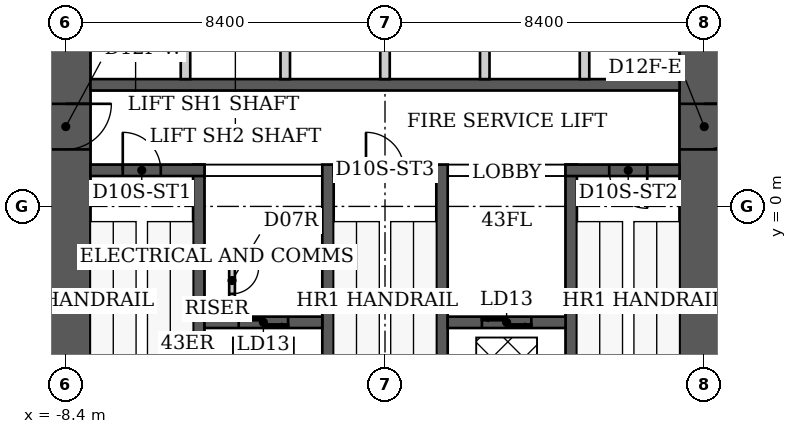
"""IFC4 building model, lengths in metres.
Left out: names, types, materials, properties, quantities, classifications, styles, units other than length and angle.
Written with IfcOpenShell. Run it as: python <this file> out.ifc"""

import sys

from ifc_helpers import new_model, si_unit, direction, frame, frame_2d, origin, place, context, subcontext, project, spatial, rectangle, extrude, element, fill, save


model = new_model("IFC4")
c1 = context("Model", 3, precision=1e-05, world=origin(), true_north=direction((0.0, 1.0)))
c2 = subcontext(c1, "Body", "Model", "MODEL_VIEW")
j1 = project(units=[si_unit("LENGTHUNIT", "METRE"), si_unit("PLANEANGLEUNIT", "RADIAN")], contexts=[c1])
p1 = place(None, origin())
s1 = spatial("IfcSite", under=j1, at=p1, CompositionType="ELEMENT")
p2 = place(p1, origin())
s2 = spatial("IfcBuilding", under=s1, at=p2, CompositionType="ELEMENT")
p3 = place(p2, frame((0.0, 0.0, 172.8)))
s3 = spatial("IfcBuildingStorey", under=s2, at=p3, CompositionType="ELEMENT", Elevation=172.8)
p4 = place(p3, frame((-8.4, -9.2, 0.0), z_axis=(0.0, 0.0, 1.0), x_axis=(0.0, 1.0, 0.0)))
e1 = element("IfcWall", 1, at=p4, inside=s3, PredefinedType="SHEAR", context=c2, shape_type="SweptSolid", body=[
    extrude(rectangle(XDim=15.3, YDim=1.3, at=frame_2d((7.65, 0.0))), origin(), (0.0, 0.0, 1.0), 5.4),
])
p5 = place(p4, frame((10.7, 0.0, 0.0)))
e2 = element("IfcOpeningElement", 2, at=p5, cuts=e1, PredefinedType="OPENING", context=c2, shape_type="SweptSolid", body=[
    extrude(rectangle(XDim=1.2, YDim=2.2, at=frame_2d((0.6, 1.1))), frame((0.0, 0.65, 0.0), z_axis=(0.0, -1.0, 0.0), x_axis=(1.0, 0.0, 0.0)), (0.0, 0.0, 1.0), 1.3),
])
p6 = place(p3, frame((8.4, -9.2, 0.0), z_axis=(0.0, 0.0, 1.0), x_axis=(0.0, 1.0, 0.0)))
e3 = element("IfcWall", 3, at=p6, inside=s3, PredefinedType="SHEAR", context=c2, shape_type="SweptSolid", body=[
    extrude(rectangle(XDim=15.3, YDim=1.3, at=frame_2d((7.65, 0.0))), origin(), (0.0, 0.0, 1.0), 5.4),
])
p7 = place(p6, frame((10.7, 0.0, 0.0)))
e4 = element("IfcOpeningElement", 4, at=p7, cuts=e3, PredefinedType="OPENING", context=c2, shape_type="SweptSolid", body=[
    extrude(rectangle(XDim=1.2, YDim=2.2, at=frame_2d((0.6, 1.1))), frame((0.0, 0.65, 0.0), z_axis=(0.0, -1.0, 0.0), x_axis=(1.0, 0.0, 0.0)), (0.0, 0.0, 1.0), 1.3),
])
for number, where, z_axis, x_axis in (
    (5, (-4.9, -6.1, 0.0), (0.0, 0.0, 1.0), (0.0, 1.0, 0.0)),
    (6, (-1.5, -6.1, 0.0), (0.0, 0.0, 1.0), (0.0, 1.0, 0.0)),
    (7, (1.5, -6.1, 0.0), (0.0, 0.0, 1.0), (0.0, 1.0, 0.0)),
    (8, (4.9, -6.1, 0.0), (0.0, 0.0, 1.0), (0.0, 1.0, 0.0)),
):
    element("IfcWall", number, at=place(p3, frame(where, z_axis=z_axis, x_axis=x_axis)), inside=s3, PredefinedType="SHEAR", context=c2, shape_type="SweptSolid", body=[
        extrude(rectangle(XDim=7.2, YDim=0.3, at=frame_2d((3.6, 0.0))), origin(), (0.0, 0.0, 1.0), 5.4),
    ])
p8 = place(p3, frame((-7.75, 0.95, 0.0), z_axis=(0.0, 0.0, 1.0), x_axis=(1.0, 0.0, 0.0)))
e9 = element("IfcWall", 9, at=p8, inside=s3, PredefinedType="SHEAR", context=c2, shape_type="SweptSolid", body=[
    extrude(rectangle(XDim=3.0, YDim=0.3, at=frame_2d((1.5, 0.0))), origin(), (0.0, 0.0, 1.0), 5.4),
])
p9 = place(p8, frame((0.85, 0.0, 0.0)))
e10 = element("IfcOpeningElement", 10, at=p9, cuts=e9, PredefinedType="OPENING", context=c2, shape_type="SweptSolid", body=[
    extrude(rectangle(XDim=1.0, YDim=2.2, at=frame_2d((0.5, 1.1))), frame((0.0, 0.15, 0.0), z_axis=(0.0, -1.0, 0.0), x_axis=(1.0, 0.0, 0.0)), (0.0, 0.0, 1.0), 0.3),
])
p10 = place(p3, frame((-1.35, 0.95, 0.0), z_axis=(0.0, 0.0, 1.0), x_axis=(1.0, 0.0, 0.0)))
e11 = element("IfcWall", 11, at=p10, inside=s3, PredefinedType="SHEAR", context=c2, shape_type="SweptSolid", body=[
    extrude(rectangle(XDim=2.7, YDim=0.3, at=frame_2d((1.35, 0.0))), origin(), (0.0, 0.0, 1.0), 5.4),
])
p11 = place(p10, frame((0.85, 0.0, 0.0)))
e12 = element("IfcOpeningElement", 12, at=p11, cuts=e11, PredefinedType="OPENING", context=c2, shape_type="SweptSolid", body=[
    extrude(rectangle(XDim=1.0, YDim=2.2, at=frame_2d((0.5, 1.1))), frame((0.0, 0.15, 0.0), z_axis=(0.0, -1.0, 0.0), x_axis=(1.0, 0.0, 0.0)), (0.0, 0.0, 1.0), 0.3),
])
p12 = place(p3, frame((4.75, 0.95, 0.0), z_axis=(0.0, 0.0, 1.0), x_axis=(1.0, 0.0, 0.0)))
e13 = element("IfcWall", 13, at=p12, inside=s3, PredefinedType="SHEAR", context=c2, shape_type="SweptSolid", body=[
    extrude(rectangle(XDim=3.0, YDim=0.3, at=frame_2d((1.5, 0.0))), origin(), (0.0, 0.0, 1.0), 5.4),
])
p13 = place(p12, frame((1.15, 0.0, 0.0)))
e14 = element("IfcOpeningElement", 14, at=p13, cuts=e13, PredefinedType="OPENING", context=c2, shape_type="SweptSolid", body=[
    extrude(rectangle(XDim=1.0, YDim=2.2, at=frame_2d((0.5, 1.1))), frame((0.0, 0.15, 0.0), z_axis=(0.0, -1.0, 0.0), x_axis=(1.0, 0.0, 0.0)), (0.0, 0.0, 1.0), 0.3),
])
p14 = place(p3, frame((-4.75, -3.05, 0.0), z_axis=(0.0, 0.0, 1.0), x_axis=(1.0, 0.0, 0.0)))
e15 = element("IfcWall", 15, at=p14, inside=s3, PredefinedType="SHEAR", context=c2, shape_type="SweptSolid", body=[
    extrude(rectangle(XDim=3.1, YDim=0.3, at=frame_2d((1.55, 0.0))), origin(), (0.0, 0.0, 1.0), 5.4),
])
p15 = place(p14, frame((0.9, 0.0, 0.0)))
e16 = element("IfcOpeningElement", 16, at=p15, cuts=e15, PredefinedType="OPENING", context=c2, shape_type="SweptSolid", body=[
    extrude(rectangle(XDim=1.3, YDim=2.1, at=frame_2d((0.65, 1.05))), frame((0.0, 0.15, 0.0), z_axis=(0.0, -1.0, 0.0), x_axis=(1.0, 0.0, 0.0)), (0.0, 0.0, 1.0), 0.3),
])
p16 = place(p3, frame((1.65, -3.05, 0.0), z_axis=(0.0, 0.0, 1.0), x_axis=(1.0, 0.0, 0.0)))
e17 = element("IfcWall", 17, at=p16, inside=s3, PredefinedType="SHEAR", context=c2, shape_type="SweptSolid", body=[
    extrude(rectangle(XDim=3.1, YDim=0.3, at=frame_2d((1.55, 0.0))), origin(), (0.0, 0.0, 1.0), 5.4),
])
p17 = place(p16, frame((0.9, 0.0, 0.0)))
e18 = element("IfcOpeningElement", 18, at=p17, cuts=e17, PredefinedType="OPENING", context=c2, shape_type="SweptSolid", body=[
    extrude(rectangle(XDim=1.3, YDim=2.1, at=frame_2d((0.65, 1.05))), frame((0.0, 0.15, 0.0), z_axis=(0.0, -1.0, 0.0), x_axis=(1.0, 0.0, 0.0)), (0.0, 0.0, 1.0), 0.3),
])
p18 = place(p3, frame((-7.75, 3.2, 0.0), z_axis=(0.0, 0.0, 1.0), x_axis=(1.0, 0.0, 0.0)))
e19 = element("IfcWall", 19, at=p18, inside=s3, PredefinedType="SHEAR", context=c2, shape_type="SweptSolid", body=[
    extrude(rectangle(XDim=15.5, YDim=0.3, at=frame_2d((7.75, 0.0))), origin(), (0.0, 0.0, 1.0), 5.4),
])
for number, where, z_axis, x_axis in (
    (20, (-5.25, 3.35, 0.0), (0.0, 0.0, 1.0), (0.0, 1.0, 0.0)),
    (21, (-2.625, 3.35, 0.0), (0.0, 0.0, 1.0), (0.0, 1.0, 0.0)),
    (22, (0.0, 3.35, 0.0), (0.0, 0.0, 1.0), (0.0, 1.0, 0.0)),
    (23, (2.625, 3.35, 0.0), (0.0, 0.0, 1.0), (0.0, 1.0, 0.0)),
    (24, (5.25, 3.35, 0.0), (0.0, 0.0, 1.0), (0.0, 1.0, 0.0)),
):
    element("IfcWall", number, at=place(p3, frame(where, z_axis=z_axis, x_axis=x_axis)), inside=s3, PredefinedType="PARTITIONING", context=c2, shape_type="SweptSolid", body=[
        extrude(rectangle(XDim=2.75, YDim=0.25, at=frame_2d((1.375, 0.0))), origin(), (0.0, 0.0, 1.0), 5.4),
    ])
p19 = place(p3, frame((-4.025, -2.9, 0.0), z_axis=(0.0, 0.0, 1.0), x_axis=(0.0, 1.0, 0.0)))
e25 = element("IfcWall", 25, at=p19, inside=s3, PredefinedType="PARTITIONING", context=c2, shape_type="SweptSolid", body=[
    extrude(rectangle(XDim=1.775, YDim=0.15, at=frame_2d((0.887, 0.0))), origin(), (0.0, 0.0, 1.0), 5.24),
])
p20 = place(p19, frame((0.6, 0.0, 0.0)))
e26 = element("IfcOpeningElement", 26, at=p20, cuts=e25, PredefinedType="OPENING", context=c2, shape_type="SweptSolid", body=[
    extrude(rectangle(XDim=0.7, YDim=2.1, at=frame_2d((0.35, 1.05))), frame((0.0, 0.075, 0.0), z_axis=(0.0, -1.0, 0.0), x_axis=(1.0, 0.0, 0.0)), (0.0, 0.0, 1.0), 0.15),
])
p21 = place(p3, frame((-4.75, -1.2, 0.0), z_axis=(0.0, 0.0, 1.0), x_axis=(1.0, 0.0, 0.0)))
e27 = element("IfcWall", 27, at=p21, inside=s3, PredefinedType="PARTITIONING", context=c2, shape_type="SweptSolid", body=[
    extrude(rectangle(XDim=0.8, YDim=0.15, at=frame_2d((0.4, 0.0))), origin(), (0.0, 0.0, 1.0), 5.24),
])
p22 = place(p9, origin())
e28 = element("IfcDoor", 28, at=p22, inside=s3, OperationType="SINGLE_SWING_LEFT", PredefinedType="DOOR", context=c2, shape_type="SweptSolid", body=[
    extrude(rectangle(XDim=1.0, YDim=2.2, at=frame_2d((0.5, 1.1))), frame((0.0, 0.025, 0.0), z_axis=(0.0, -1.0, 0.0), x_axis=(1.0, 0.0, 0.0)), (0.0, 0.0, 1.0), 0.05),
])
fill(e10, e28)
p23 = place(p11, origin())
e29 = element("IfcDoor", 29, at=p23, inside=s3, OperationType="SINGLE_SWING_LEFT", PredefinedType="DOOR", context=c2, shape_type="SweptSolid", body=[
    extrude(rectangle(XDim=1.0, YDim=2.2, at=frame_2d((0.5, 1.1))), frame((0.0, 0.025, 0.0), z_axis=(0.0, -1.0, 0.0), x_axis=(1.0, 0.0, 0.0)), (0.0, 0.0, 1.0), 0.05),
])
fill(e12, e29)
p24 = place(p13, origin())
e30 = element("IfcDoor", 30, at=p24, inside=s3, OperationType="SINGLE_SWING_RIGHT", PredefinedType="DOOR", context=c2, shape_type="SweptSolid", body=[
    extrude(rectangle(XDim=1.0, YDim=2.2, at=frame_2d((0.5, 1.1))), frame((0.0, 0.025, 0.0), z_axis=(0.0, -1.0, 0.0), x_axis=(1.0, 0.0, 0.0)), (0.0, 0.0, 1.0), 0.05),
])
fill(e14, e30)
p25 = place(p5, origin())
e31 = element("IfcDoor", 31, at=p25, inside=s3, OperationType="SINGLE_SWING_RIGHT", PredefinedType="DOOR", context=c2, shape_type="SweptSolid", body=[
    extrude(rectangle(XDim=1.2, YDim=2.2, at=frame_2d((0.6, 1.1))), frame((0.0, 0.025, 0.0), z_axis=(0.0, -1.0, 0.0), x_axis=(1.0, 0.0, 0.0)), (0.0, 0.0, 1.0), 0.05),
])
fill(e2, e31)
p26 = place(p7, origin())
e32 = element("IfcDoor", 32, at=p26, inside=s3, OperationType="SINGLE_SWING_RIGHT", PredefinedType="DOOR", context=c2, shape_type="SweptSolid", body=[
    extrude(rectangle(XDim=1.2, YDim=2.2, at=frame_2d((0.6, 1.1))), frame((0.0, 0.025, 0.0), z_axis=(0.0, -1.0, 0.0), x_axis=(1.0, 0.0, 0.0)), (0.0, 0.0, 1.0), 0.05),
])
fill(e4, e32)
p27 = place(p20, origin())
e33 = element("IfcDoor", 33, at=p27, inside=s3, OperationType="SINGLE_SWING_RIGHT", PredefinedType="DOOR", context=c2, shape_type="SweptSolid", body=[
    extrude(rectangle(XDim=0.7, YDim=2.1, at=frame_2d((0.35, 1.05))), frame((0.0, 0.025, 0.0), z_axis=(0.0, -1.0, 0.0), x_axis=(1.0, 0.0, 0.0)), (0.0, 0.0, 1.0), 0.05),
])
fill(e26, e33)
p28 = place(p15, origin())
e34 = element("IfcDoor", 34, at=p28, inside=s3, OperationType="DOUBLE_DOOR_SLIDING", PredefinedType="DOOR", context=c2, shape_type="SweptSolid", body=[
    extrude(rectangle(XDim=1.3, YDim=2.1, at=frame_2d((0.65, 1.05))), frame((0.0, 0.025, 0.0), z_axis=(0.0, -1.0, 0.0), x_axis=(1.0, 0.0, 0.0)), (0.0, 0.0, 1.0), 0.05),
])
fill(e16, e34)
p29 = place(p17, origin())
e35 = element("IfcDoor", 35, at=p29, inside=s3, OperationType="DOUBLE_DOOR_SLIDING", PredefinedType="DOOR", context=c2, shape_type="SweptSolid", body=[
    extrude(rectangle(XDim=1.3, YDim=2.1, at=frame_2d((0.65, 1.05))), frame((0.0, 0.025, 0.0), z_axis=(0.0, -1.0, 0.0), x_axis=(1.0, 0.0, 0.0)), (0.0, 0.0, 1.0), 0.05),
])
fill(e18, e35)
save(model, sys.argv[1])
